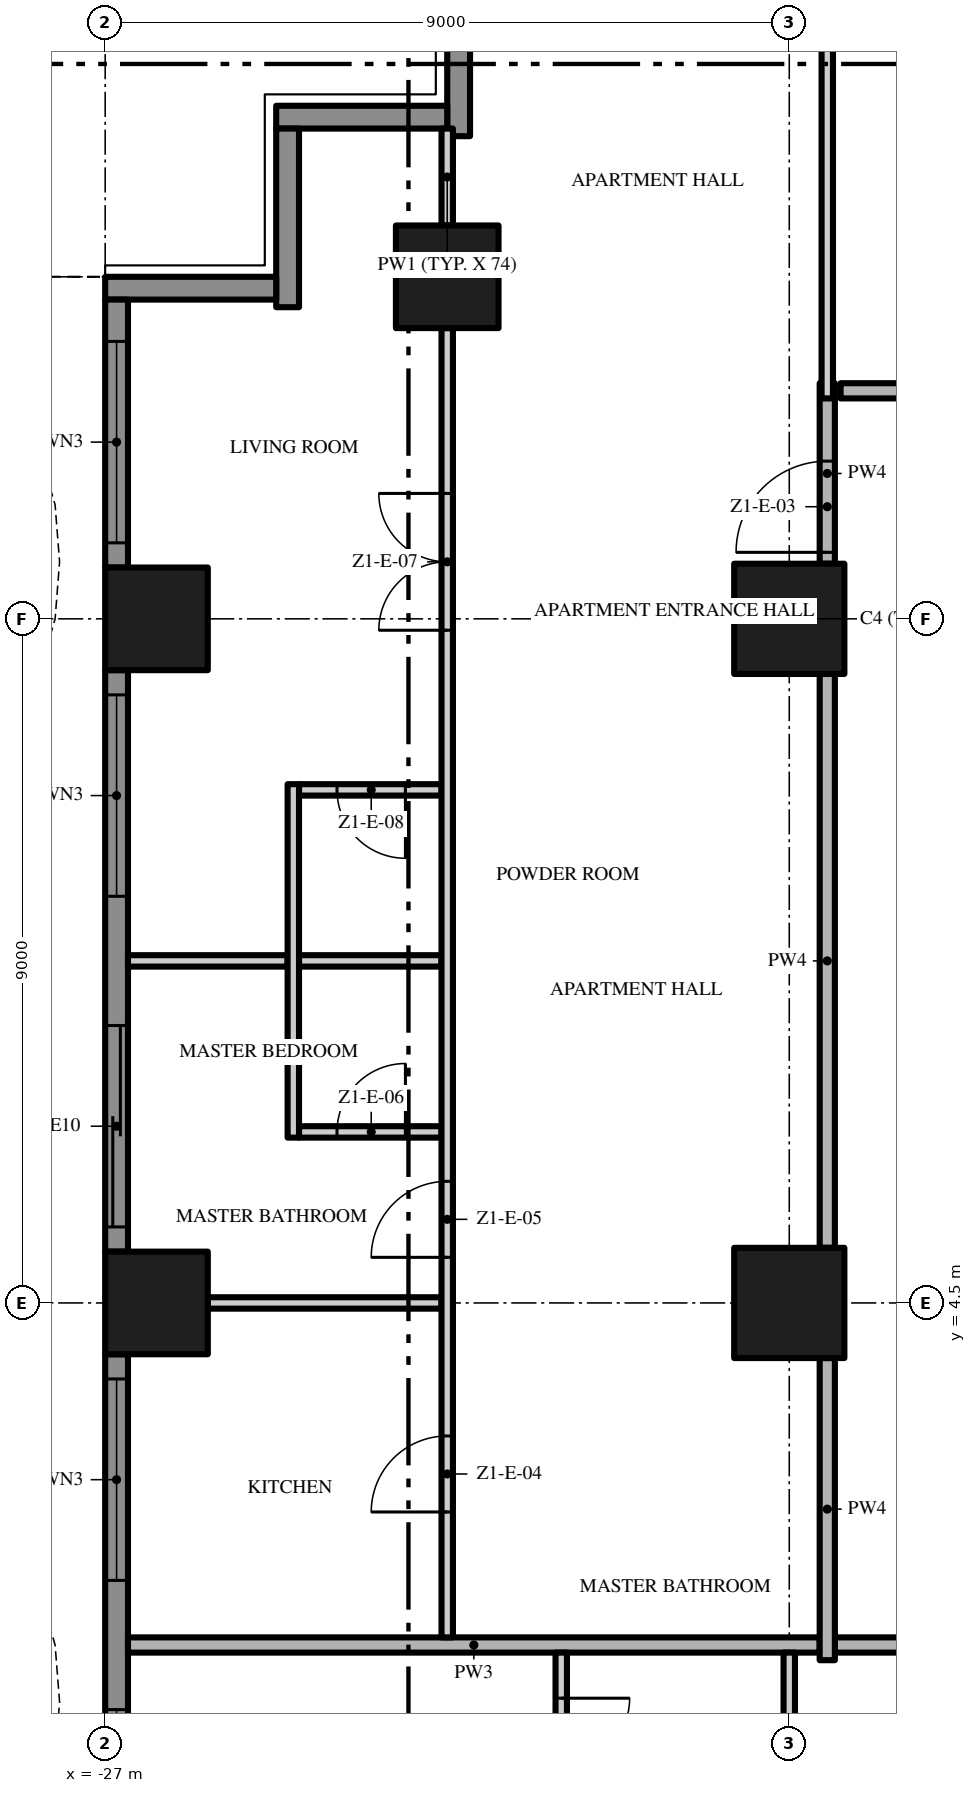
"""IFC4 building model, lengths in metres.
Left out: names, types, materials, properties, quantities, classifications, styles, units other than length and angle.
Written with IfcOpenShell. Run it as: python <this file> out.ifc"""

import sys

from ifc_helpers import new_model, si_unit, direction, frame, frame_2d, origin, origin_2d, place, context, subcontext, project, spatial, polyline, rectangle, outline, extrude, element, fill, save


model = new_model("IFC4")
c1 = context("Model", 3, precision=1e-05, world=origin(), true_north=direction((0.0, 1.0)))
c2 = subcontext(c1, "Body", "Model", "MODEL_VIEW")
j1 = project(units=[si_unit("LENGTHUNIT", "METRE"), si_unit("PLANEANGLEUNIT", "RADIAN")], contexts=[c1])
p1 = place(None, origin())
s1 = spatial("IfcSite", under=j1, at=p1, CompositionType="ELEMENT")
p2 = place(p1, origin())
s2 = spatial("IfcBuilding", under=s1, at=p2, CompositionType="ELEMENT")
p3 = place(p2, frame((0.0, 0.0, 60.6)))
s3 = spatial("IfcBuildingStorey", under=s2, at=p3, CompositionType="ELEMENT", Elevation=60.6)
for number, where, z_axis, x_axis in (
    (1, (-18.0, 13.5, 0.0), (0.0, 0.0, 1.0), (1.0, 0.0, 0.0)),
    (2, (-18.0, 4.5, 0.0), (0.0, 0.0, 1.0), (1.0, 0.0, 0.0)),
):
    element("IfcColumn", number, at=place(p3, frame(where, z_axis=z_axis, x_axis=x_axis)), inside=s3, PredefinedType="COLUMN", context=c2, shape_type="SweptSolid", body=[
        extrude(rectangle(XDim=1.45, YDim=1.45, at=origin_2d()), origin(), (0.0, 0.0, 1.0), 3.5),
    ])
for number, where, z_axis, x_axis in (
    (3, (-26.325, 13.5, 0.0), (0.0, 0.0, 1.0), (1.0, 0.0, 0.0)),
    (4, (-22.5, 18.0, 0.0), (0.0, 0.0, 1.0), (1.0, 0.0, 0.0)),
    (5, (-26.325, 4.5, 0.0), (0.0, 0.0, 1.0), (1.0, 0.0, 0.0)),
):
    element("IfcColumn", number, at=place(p3, frame(where, z_axis=z_axis, x_axis=x_axis)), inside=s3, PredefinedType="COLUMN", context=c2, shape_type="SweptSolid", body=[
        extrude(rectangle(XDim=1.35, YDim=1.35, at=origin_2d()), origin(), (0.0, 0.0, 1.0), 3.5),
    ])
p4 = place(p3, frame((-22.35, 19.85, 0.0), z_axis=(0.0, 0.0, 1.0), x_axis=(0.0, 1.0, 0.0)))
e6 = element("IfcWall", 6, at=p4, inside=s3, PredefinedType="SOLIDWALL", context=c2, shape_type="SweptSolid", body=[
    extrude(rectangle(XDim=2.35, YDim=0.3, at=frame_2d((1.175, 0.0))), origin(), (0.0, 0.0, 1.0), 3.5),
])
p5 = place(p3, frame((-24.75, 20.1, 0.0), z_axis=(0.0, 0.0, 1.0), x_axis=(1.0, 0.0, 0.0)))
e7 = element("IfcWall", 7, at=p5, inside=s3, PredefinedType="SOLIDWALL", context=c2, shape_type="SweptSolid", body=[
    extrude(rectangle(XDim=2.25, YDim=0.3, at=frame_2d((1.125, 0.0))), origin(), (0.0, 0.0, 1.0), 3.5),
])
p6 = place(p3, frame((-24.6, 17.6, 0.0), z_axis=(0.0, 0.0, 1.0), x_axis=(0.0, 1.0, 0.0)))
e8 = element("IfcWall", 8, at=p6, inside=s3, PredefinedType="SOLIDWALL", context=c2, shape_type="SweptSolid", body=[
    extrude(rectangle(XDim=2.35, YDim=0.3, at=frame_2d((1.175, 0.0))), origin(), (0.0, 0.0, 1.0), 3.5),
])
p7 = place(p3, frame((-27.0, 17.85, 0.0), z_axis=(0.0, 0.0, 1.0), x_axis=(1.0, 0.0, 0.0)))
e9 = element("IfcWall", 9, at=p7, inside=s3, PredefinedType="SOLIDWALL", context=c2, shape_type="SweptSolid", body=[
    extrude(rectangle(XDim=2.25, YDim=0.3, at=frame_2d((1.125, 0.0))), origin(), (0.0, 0.0, 1.0), 3.5),
])
p8 = place(p3, frame((-26.85, 14.175, 0.0), z_axis=(0.0, 0.0, 1.0), x_axis=(0.0, 1.0, 0.0)))
e10 = element("IfcWall", 10, at=p8, inside=s3, PredefinedType="SOLIDWALL", context=c2, shape_type="SweptSolid", body=[
    extrude(rectangle(XDim=3.525, YDim=0.3, at=frame_2d((1.762, 0.0))), origin(), (0.0, 0.0, 1.0), 3.5),
])
p9 = place(p8, frame((0.325, 0.0, 0.45)))
e11 = element("IfcOpeningElement", 11, at=p9, cuts=e10, PredefinedType="OPENING", context=c2, shape_type="SweptSolid", body=[
    extrude(rectangle(XDim=2.65, YDim=2.65, at=frame_2d((1.325, 1.325))), frame((0.0, 0.16, 0.0), z_axis=(0.0, -1.0, 0.0), x_axis=(1.0, 0.0, 0.0)), (0.0, 0.0, 1.0), 0.32),
])
p10 = place(p3, frame((-26.85, 5.175, 0.0), z_axis=(0.0, 0.0, 1.0), x_axis=(0.0, 1.0, 0.0)))
e12 = element("IfcWall", 12, at=p10, inside=s3, PredefinedType="SOLIDWALL", context=c2, shape_type="SweptSolid", body=[
    extrude(rectangle(XDim=7.65, YDim=0.3, at=frame_2d((3.825, 0.0))), origin(), (0.0, 0.0, 1.0), 3.5),
])
p11 = place(p10, frame((4.675, 0.0, 0.45)))
e13 = element("IfcOpeningElement", 13, at=p11, cuts=e12, PredefinedType="OPENING", context=c2, shape_type="SweptSolid", body=[
    extrude(rectangle(XDim=2.65, YDim=2.65, at=frame_2d((1.325, 1.325))), frame((0.0, 0.16, 0.0), z_axis=(0.0, -1.0, 0.0), x_axis=(1.0, 0.0, 0.0)), (0.0, 0.0, 1.0), 0.32),
])
p12 = place(p10, frame((0.325, 0.0, 0.0)))
e14 = element("IfcOpeningElement", 14, at=p12, cuts=e12, PredefinedType="OPENING", context=c2, shape_type="SweptSolid", body=[
    extrude(rectangle(XDim=2.65, YDim=2.4, at=frame_2d((1.325, 1.2))), frame((0.0, 0.16, 0.0), z_axis=(0.0, -1.0, 0.0), x_axis=(1.0, 0.0, 0.0)), (0.0, 0.0, 1.0), 0.32),
])
p13 = place(p3, frame((-26.85, -3.825, 0.0), z_axis=(0.0, 0.0, 1.0), x_axis=(0.0, 1.0, 0.0)))
e15 = element("IfcWall", 15, at=p13, inside=s3, PredefinedType="SOLIDWALL", context=c2, shape_type="SweptSolid", body=[
    extrude(rectangle(XDim=7.65, YDim=0.3, at=frame_2d((3.825, 0.0))), origin(), (0.0, 0.0, 1.0), 3.5),
])
p14 = place(p13, frame((4.675, 0.0, 0.45)))
e16 = element("IfcOpeningElement", 16, at=p14, cuts=e15, PredefinedType="OPENING", context=c2, shape_type="SweptSolid", body=[
    extrude(rectangle(XDim=2.65, YDim=2.65, at=frame_2d((1.325, 1.325))), frame((0.0, 0.16, 0.0), z_axis=(0.0, -1.0, 0.0), x_axis=(1.0, 0.0, 0.0)), (0.0, 0.0, 1.0), 0.32),
])
p15 = place(p13, frame((0.325, 0.0, 0.45)))
e17 = element("IfcOpeningElement", 17, at=p15, cuts=e15, PredefinedType="OPENING", context=c2, shape_type="SweptSolid", body=[
    extrude(rectangle(XDim=2.65, YDim=2.65, at=frame_2d((1.325, 1.325))), frame((0.0, 0.16, 0.0), z_axis=(0.0, -1.0, 0.0), x_axis=(1.0, 0.0, 0.0)), (0.0, 0.0, 1.0), 0.32),
])
p16 = place(p3, origin())
e18 = element("IfcWall", 18, at=p16, inside=s3, PredefinedType="USERDEFINED", context=c2, shape_type="SweptSolid", body=[
    extrude(outline(polyline([(-28.8, 18.0), (-28.095, 16.5), (-27.659, 15.0), (-27.6, 14.25), (-27.659, 13.5), (-28.095, 12.0), (-28.8, 10.5), (-29.505, 9.0), (-29.941, 7.5), (-30.0, 6.75), (-29.941, 6.0), (-29.505, 4.5), (-28.8, 3.0), (-28.095, 1.5), (-27.659, 0.0), (-27.6, -0.75), (-27.659, -1.5), (-28.095, -3.0), (-28.8, -4.5), (-29.505, -6.0), (-29.941, -7.5), (-30.0, -8.25), (-29.941, -9.0), (-29.505, -10.5), (-28.8, -12.0), (-28.095, -13.5), (-27.659, -15.0), (-27.6, -15.75), (-27.659, -16.5), (-28.095, -18.0), (-27.855, -18.07), (-27.411, -16.545), (-27.349, -15.75), (-27.411, -14.955), (-27.86, -13.411), (-28.574, -11.894), (-29.271, -10.411), (-29.694, -8.955), (-29.749, -8.25), (-29.694, -7.545), (-29.271, -6.089), (-28.574, -4.606), (-27.86, -3.089), (-27.411, -1.545), (-27.349, -0.75), (-27.411, 0.045), (-27.86, 1.589), (-28.574, 3.106), (-29.271, 4.589), (-29.694, 6.045), (-29.749, 6.75), (-29.694, 7.455), (-29.271, 8.911), (-28.574, 10.394), (-27.86, 11.911), (-27.411, 13.455), (-27.349, 14.25), (-27.411, 15.045), (-27.86, 16.589), (-28.574, 18.106), (-28.8, 18.0)])), origin(), (0.0, 0.0, 1.0), 0.9),
])
p17 = place(p3, frame((-17.4, 0.0, 0.0), z_axis=(0.0, 0.0, 1.0), x_axis=(1.0, 0.0, 0.0)))
e19 = element("IfcWall", 19, at=p17, inside=s3, PredefinedType="PARTITIONING", context=c2, shape_type="SweptSolid", body=[
    extrude(rectangle(XDim=12.8, YDim=0.2, at=frame_2d((6.4, 0.0))), origin(), (0.0, 0.0, 1.0), 3.5),
])
p18 = place(p3, frame((-26.7, 0.0, 0.0), z_axis=(0.0, 0.0, 1.0), x_axis=(1.0, 0.0, 0.0)))
e20 = element("IfcWall", 20, at=p18, inside=s3, PredefinedType="PARTITIONING", context=c2, shape_type="SweptSolid", body=[
    extrude(rectangle(XDim=9.1, YDim=0.2, at=frame_2d((4.55, 0.0))), origin(), (0.0, 0.0, 1.0), 3.5),
])
p19 = place(p3, frame((-25.65, 4.5, 0.0), z_axis=(0.0, 0.0, 1.0), x_axis=(1.0, 0.0, 0.0)))
e21 = element("IfcWall", 21, at=p19, inside=s3, PredefinedType="PARTITIONING", context=c2, shape_type="SweptSolid", body=[
    extrude(rectangle(XDim=3.075, YDim=0.15, at=frame_2d((1.538, 0.0))), origin(), (0.0, 0.0, 1.0), 3.5),
])
p20 = place(p3, frame((-24.45, 6.75, 0.0), z_axis=(0.0, 0.0, 1.0), x_axis=(1.0, 0.0, 0.0)))
e22 = element("IfcWall", 22, at=p20, inside=s3, PredefinedType="PARTITIONING", context=c2, shape_type="SweptSolid", body=[
    extrude(rectangle(XDim=1.875, YDim=0.15, at=frame_2d((0.938, 0.0))), origin(), (0.0, 0.0, 1.0), 3.5),
])
p21 = place(p20, frame((0.5, 0.0, 0.0)))
e23 = element("IfcOpeningElement", 23, at=p21, cuts=e22, PredefinedType="OPENING", context=c2, shape_type="SweptSolid", body=[
    extrude(rectangle(XDim=0.9, YDim=2.1, at=frame_2d((0.45, 1.05))), frame((0.0, 0.085, 0.0), z_axis=(0.0, -1.0, 0.0), x_axis=(1.0, 0.0, 0.0)), (0.0, 0.0, 1.0), 0.17),
])
p22 = place(p3, frame((-26.7, 9.0, 0.0), z_axis=(0.0, 0.0, 1.0), x_axis=(1.0, 0.0, 0.0)))
e24 = element("IfcWall", 24, at=p22, inside=s3, PredefinedType="PARTITIONING", context=c2, shape_type="SweptSolid", body=[
    extrude(rectangle(XDim=2.1, YDim=0.15, at=frame_2d((1.05, 0.0))), origin(), (0.0, 0.0, 1.0), 3.5),
])
p23 = place(p3, frame((-24.45, 9.0, 0.0), z_axis=(0.0, 0.0, 1.0), x_axis=(1.0, 0.0, 0.0)))
e25 = element("IfcWall", 25, at=p23, inside=s3, PredefinedType="PARTITIONING", context=c2, shape_type="SweptSolid", body=[
    extrude(rectangle(XDim=1.875, YDim=0.15, at=frame_2d((0.938, 0.0))), origin(), (0.0, 0.0, 1.0), 3.5),
])
p24 = place(p3, frame((-22.575, 11.25, 0.0), z_axis=(0.0, 0.0, 1.0), x_axis=(-1.0, 0.0, 0.0)))
e26 = element("IfcWall", 26, at=p24, inside=s3, PredefinedType="PARTITIONING", context=c2, shape_type="SweptSolid", body=[
    extrude(rectangle(XDim=1.875, YDim=0.15, at=frame_2d((0.938, 0.0))), origin(), (0.0, 0.0, 1.0), 3.5),
])
p25 = place(p24, frame((0.475, 0.0, 0.0)))
e27 = element("IfcOpeningElement", 27, at=p25, cuts=e26, PredefinedType="OPENING", context=c2, shape_type="SweptSolid", body=[
    extrude(rectangle(XDim=0.9, YDim=2.1, at=frame_2d((0.45, 1.05))), frame((0.0, 0.085, 0.0), z_axis=(0.0, -1.0, 0.0), x_axis=(1.0, 0.0, 0.0)), (0.0, 0.0, 1.0), 0.17),
])
p26 = place(p3, frame((-17.325, 16.5, 0.0), z_axis=(0.0, 0.0, 1.0), x_axis=(1.0, 0.0, 0.0)))
e28 = element("IfcWall", 28, at=p26, inside=s3, PredefinedType="PARTITIONING", context=c2, shape_type="SweptSolid", body=[
    extrude(rectangle(XDim=3.825, YDim=0.2, at=frame_2d((1.913, 0.0))), origin(), (0.0, 0.0, 1.0), 3.5),
])
p27 = place(p26, frame((1.35, 0.0, 0.0)))
e29 = element("IfcOpeningElement", 29, at=p27, cuts=e28, PredefinedType="OPENING", context=c2, shape_type="SweptSolid", body=[
    extrude(rectangle(XDim=0.9, YDim=2.1, at=frame_2d((0.45, 1.05))), frame((0.0, 0.11, 0.0), z_axis=(0.0, -1.0, 0.0), x_axis=(1.0, 0.0, 0.0)), (0.0, 0.0, 1.0), 0.22),
])
p28 = place(p3, frame((-24.525, 6.675, 0.0), z_axis=(0.0, 0.0, 1.0), x_axis=(0.0, 1.0, 0.0)))
e30 = element("IfcWall", 30, at=p28, inside=s3, PredefinedType="PARTITIONING", context=c2, shape_type="SweptSolid", body=[
    extrude(rectangle(XDim=4.65, YDim=0.15, at=frame_2d((2.325, 0.0))), origin(), (0.0, 0.0, 1.0), 3.5),
])
p29 = place(p3, frame((-22.5, 0.1, 0.0), z_axis=(0.0, 0.0, 1.0), x_axis=(0.0, 1.0, 0.0)))
e31 = element("IfcWall", 31, at=p29, inside=s3, PredefinedType="PARTITIONING", context=c2, shape_type="SweptSolid", body=[
    extrude(rectangle(XDim=17.225, YDim=0.15, at=frame_2d((8.613, 0.0))), origin(), (0.0, 0.0, 1.0), 3.5),
])
p30 = place(p29, frame((1.65, 0.0, 0.0)))
e32 = element("IfcOpeningElement", 32, at=p30, cuts=e31, PredefinedType="OPENING", context=c2, shape_type="SweptSolid", body=[
    extrude(rectangle(XDim=1.0, YDim=2.4, at=frame_2d((0.5, 1.2))), frame((0.0, 0.085, 0.0), z_axis=(0.0, -1.0, 0.0), x_axis=(1.0, 0.0, 0.0)), (0.0, 0.0, 1.0), 0.17),
])
p31 = place(p29, frame((5.0, 0.0, 0.0)))
e33 = element("IfcOpeningElement", 33, at=p31, cuts=e31, PredefinedType="OPENING", context=c2, shape_type="SweptSolid", body=[
    extrude(rectangle(XDim=1.0, YDim=2.4, at=frame_2d((0.5, 1.2))), frame((0.0, 0.085, 0.0), z_axis=(0.0, -1.0, 0.0), x_axis=(1.0, 0.0, 0.0)), (0.0, 0.0, 1.0), 0.17),
])
p32 = place(p29, frame((13.25, 0.0, 0.0)))
e34 = element("IfcOpeningElement", 34, at=p32, cuts=e31, PredefinedType="OPENING", context=c2, shape_type="SweptSolid", body=[
    extrude(rectangle(XDim=1.8, YDim=2.4, at=frame_2d((0.9, 1.2))), frame((0.0, 0.085, 0.0), z_axis=(0.0, -1.0, 0.0), x_axis=(1.0, 0.0, 0.0)), (0.0, 0.0, 1.0), 0.17),
])
p33 = place(p3, frame((-22.5, 18.675, 0.0), z_axis=(0.0, 0.0, 1.0), x_axis=(0.0, 1.0, 0.0)))
e35 = element("IfcWall", 35, at=p33, inside=s3, PredefinedType="PARTITIONING", context=c2, shape_type="SweptSolid", body=[
    extrude(rectangle(XDim=1.275, YDim=0.15, at=frame_2d((0.637, 0.0))), origin(), (0.0, 0.0, 1.0), 3.5),
])
p34 = place(p3, frame((-21.0, -0.1, 0.0), z_axis=(0.0, 0.0, 1.0), x_axis=(0.0, -1.0, 0.0)))
e36 = element("IfcWall", 36, at=p34, inside=s3, PredefinedType="PARTITIONING", context=c2, shape_type="SweptSolid", body=[
    extrude(rectangle(XDim=2.225, YDim=0.15, at=frame_2d((1.113, 0.0))), origin(), (0.0, 0.0, 1.0), 3.5),
])
p35 = place(p34, frame((0.6, 0.0, 0.0)))
e37 = element("IfcOpeningElement", 37, at=p35, cuts=e36, PredefinedType="OPENING", context=c2, shape_type="SweptSolid", body=[
    extrude(rectangle(XDim=0.9, YDim=2.1, at=frame_2d((0.45, 1.05))), frame((0.0, 0.085, 0.0), z_axis=(0.0, -1.0, 0.0), x_axis=(1.0, 0.0, 0.0)), (0.0, 0.0, 1.0), 0.17),
])
p36 = place(p3, frame((-18.0, -3.775, 0.0), z_axis=(0.0, 0.0, 1.0), x_axis=(0.0, 1.0, 0.0)))
e38 = element("IfcWall", 38, at=p36, inside=s3, PredefinedType="PARTITIONING", context=c2, shape_type="SweptSolid", body=[
    extrude(rectangle(XDim=3.675, YDim=0.15, at=frame_2d((1.837, 0.0))), origin(), (0.0, 0.0, 1.0), 3.5),
])
p37 = place(p36, frame((0.15, 0.0, 0.0)))
e39 = element("IfcOpeningElement", 39, at=p37, cuts=e38, PredefinedType="OPENING", context=c2, shape_type="SweptSolid", body=[
    extrude(rectangle(XDim=1.0, YDim=2.4, at=frame_2d((0.5, 1.2))), frame((0.0, 0.085, 0.0), z_axis=(0.0, -1.0, 0.0), x_axis=(1.0, 0.0, 0.0)), (0.0, 0.0, 1.0), 0.17),
])
p38 = place(p3, frame((-17.5, -0.2, 0.0), z_axis=(0.0, 0.0, 1.0), x_axis=(0.0, 1.0, 0.0)))
e40 = element("IfcWall", 40, at=p38, inside=s3, PredefinedType="PARTITIONING", context=c2, shape_type="SweptSolid", body=[
    extrude(rectangle(XDim=3.975, YDim=0.2, at=frame_2d((1.988, 0.0))), origin(), (0.0, 0.0, 1.0), 3.5),
])
p39 = place(p3, frame((-17.5, 5.225, 0.0), z_axis=(0.0, 0.0, 1.0), x_axis=(0.0, 1.0, 0.0)))
e41 = element("IfcWall", 41, at=p39, inside=s3, PredefinedType="PARTITIONING", context=c2, shape_type="SweptSolid", body=[
    extrude(rectangle(XDim=7.55, YDim=0.2, at=frame_2d((3.775, 0.0))), origin(), (0.0, 0.0, 1.0), 3.5),
])
p40 = place(p3, frame((-17.5, 14.225, 0.0), z_axis=(0.0, 0.0, 1.0), x_axis=(0.0, 1.0, 0.0)))
e42 = element("IfcWall", 42, at=p40, inside=s3, PredefinedType="PARTITIONING", context=c2, shape_type="SweptSolid", body=[
    extrude(rectangle(XDim=2.375, YDim=0.2, at=frame_2d((1.188, 0.0))), origin(), (0.0, 0.0, 1.0), 3.5),
])
p41 = place(p40, frame((0.15, 0.0, 0.0)))
e43 = element("IfcOpeningElement", 43, at=p41, cuts=e42, PredefinedType="OPENING", context=c2, shape_type="SweptSolid", body=[
    extrude(rectangle(XDim=1.2, YDim=2.4, at=frame_2d((0.6, 1.2))), frame((0.0, 0.11, 0.0), z_axis=(0.0, -1.0, 0.0), x_axis=(1.0, 0.0, 0.0)), (0.0, 0.0, 1.0), 0.22),
])
p42 = place(p3, frame((-17.5, 16.4, 0.0), z_axis=(0.0, 0.0, 1.0), x_axis=(0.0, 1.0, 0.0)))
e44 = element("IfcWall", 44, at=p42, inside=s3, PredefinedType="PARTITIONING", context=c2, shape_type="SweptSolid", body=[
    extrude(rectangle(XDim=4.75, YDim=0.15, at=frame_2d((2.375, 0.0))), origin(), (0.0, 0.0, 1.0), 3.5),
])
p43 = place(p9, origin())
e45 = element("IfcWindow", 45, at=p43, inside=s3, PartitioningType="SINGLE_PANEL", PredefinedType="WINDOW", context=c2, shape_type="SweptSolid", body=[
    extrude(rectangle(XDim=2.65, YDim=2.65, at=frame_2d((1.325, 1.325))), frame((0.0, 0.03, 0.0), z_axis=(0.0, -1.0, 0.0), x_axis=(1.0, 0.0, 0.0)), (0.0, 0.0, 1.0), 0.06),
])
fill(e11, e45)
p44 = place(p11, origin())
e46 = element("IfcWindow", 46, at=p44, inside=s3, PartitioningType="SINGLE_PANEL", PredefinedType="WINDOW", context=c2, shape_type="SweptSolid", body=[
    extrude(rectangle(XDim=2.65, YDim=2.65, at=frame_2d((1.325, 1.325))), frame((0.0, 0.03, 0.0), z_axis=(0.0, -1.0, 0.0), x_axis=(1.0, 0.0, 0.0)), (0.0, 0.0, 1.0), 0.06),
])
fill(e13, e46)
p45 = place(p12, origin())
e47 = element("IfcDoor", 47, at=p45, inside=s3, OperationType="SINGLE_SWING_LEFT", PredefinedType="DOOR", context=c2, shape_type="SweptSolid", body=[
    extrude(rectangle(XDim=2.65, YDim=2.4, at=frame_2d((1.325, 1.2))), frame((0.0, 0.025, 0.0), z_axis=(0.0, -1.0, 0.0), x_axis=(1.0, 0.0, 0.0)), (0.0, 0.0, 1.0), 0.05),
])
fill(e14, e47)
p46 = place(p14, origin())
e48 = element("IfcWindow", 48, at=p46, inside=s3, PartitioningType="SINGLE_PANEL", PredefinedType="WINDOW", context=c2, shape_type="SweptSolid", body=[
    extrude(rectangle(XDim=2.65, YDim=2.65, at=frame_2d((1.325, 1.325))), frame((0.0, 0.03, 0.0), z_axis=(0.0, -1.0, 0.0), x_axis=(1.0, 0.0, 0.0)), (0.0, 0.0, 1.0), 0.06),
])
fill(e16, e48)
p47 = place(p15, origin())
e49 = element("IfcWindow", 49, at=p47, inside=s3, PartitioningType="SINGLE_PANEL", PredefinedType="WINDOW", context=c2, shape_type="SweptSolid", body=[
    extrude(rectangle(XDim=2.65, YDim=2.65, at=frame_2d((1.325, 1.325))), frame((0.0, 0.03, 0.0), z_axis=(0.0, -1.0, 0.0), x_axis=(1.0, 0.0, 0.0)), (0.0, 0.0, 1.0), 0.06),
])
fill(e17, e49)
p48 = place(p41, origin())
e50 = element("IfcDoor", 50, at=p48, inside=s3, OperationType="SINGLE_SWING_LEFT", PredefinedType="DOOR", context=c2, shape_type="SweptSolid", body=[
    extrude(rectangle(XDim=1.2, YDim=2.4, at=frame_2d((0.6, 1.2))), frame((0.0, 0.025, 0.0), z_axis=(0.0, -1.0, 0.0), x_axis=(1.0, 0.0, 0.0)), (0.0, 0.0, 1.0), 0.05),
])
fill(e43, e50)
p49 = place(p30, origin())
e51 = element("IfcDoor", 51, at=p49, inside=s3, OperationType="SINGLE_SWING_LEFT", PredefinedType="DOOR", context=c2, shape_type="SweptSolid", body=[
    extrude(rectangle(XDim=1.0, YDim=2.4, at=frame_2d((0.5, 1.2))), frame((0.0, 0.025, 0.0), z_axis=(0.0, -1.0, 0.0), x_axis=(1.0, 0.0, 0.0)), (0.0, 0.0, 1.0), 0.05),
])
fill(e32, e51)
p50 = place(p31, origin())
e52 = element("IfcDoor", 52, at=p50, inside=s3, OperationType="SINGLE_SWING_LEFT", PredefinedType="DOOR", context=c2, shape_type="SweptSolid", body=[
    extrude(rectangle(XDim=1.0, YDim=2.4, at=frame_2d((0.5, 1.2))), frame((0.0, 0.025, 0.0), z_axis=(0.0, -1.0, 0.0), x_axis=(1.0, 0.0, 0.0)), (0.0, 0.0, 1.0), 0.05),
])
fill(e33, e52)
p51 = place(p21, origin())
e53 = element("IfcDoor", 53, at=p51, inside=s3, OperationType="SINGLE_SWING_RIGHT", PredefinedType="DOOR", context=c2, shape_type="SweptSolid", body=[
    extrude(rectangle(XDim=0.9, YDim=2.1, at=frame_2d((0.45, 1.05))), frame((0.0, 0.025, 0.0), z_axis=(0.0, -1.0, 0.0), x_axis=(1.0, 0.0, 0.0)), (0.0, 0.0, 1.0), 0.05),
])
fill(e23, e53)
p52 = place(p32, origin())
e54 = element("IfcDoor", 54, at=p52, inside=s3, OperationType="DOUBLE_DOOR_SINGLE_SWING", PredefinedType="DOOR", context=c2, shape_type="SweptSolid", body=[
    extrude(rectangle(XDim=1.8, YDim=2.4, at=frame_2d((0.9, 1.2))), frame((0.0, 0.025, 0.0), z_axis=(0.0, -1.0, 0.0), x_axis=(1.0, 0.0, 0.0)), (0.0, 0.0, 1.0), 0.05),
])
fill(e34, e54)
p53 = place(p25, origin())
e55 = element("IfcDoor", 55, at=p53, inside=s3, OperationType="SINGLE_SWING_LEFT", PredefinedType="DOOR", context=c2, shape_type="SweptSolid", body=[
    extrude(rectangle(XDim=0.9, YDim=2.1, at=frame_2d((0.45, 1.05))), frame((0.0, 0.025, 0.0), z_axis=(0.0, -1.0, 0.0), x_axis=(1.0, 0.0, 0.0)), (0.0, 0.0, 1.0), 0.05),
])
fill(e27, e55)
p54 = place(p35, origin())
e56 = element("IfcDoor", 56, at=p54, inside=s3, OperationType="SINGLE_SWING_LEFT", PredefinedType="DOOR", context=c2, shape_type="SweptSolid", body=[
    extrude(rectangle(XDim=0.9, YDim=2.1, at=frame_2d((0.45, 1.05))), frame((0.0, 0.025, 0.0), z_axis=(0.0, -1.0, 0.0), x_axis=(1.0, 0.0, 0.0)), (0.0, 0.0, 1.0), 0.05),
])
fill(e37, e56)
save(model, sys.argv[1])
